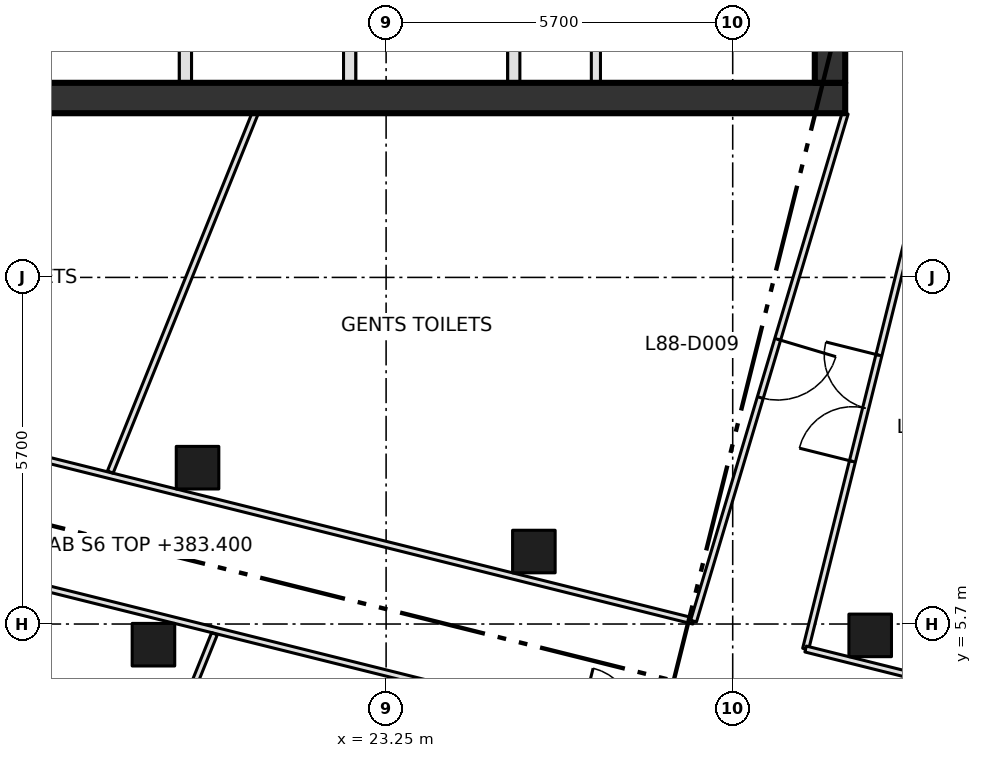
"""IFC4 building model, lengths in metres.
Left out: names, types, materials, properties, quantities, classifications, styles, units other than length and angle.
Written with IfcOpenShell. Run it as: python <this file> out.ifc"""

import sys

from ifc_helpers import new_model, si_unit, direction, frame, frame_2d, origin, origin_2d, place, context, subcontext, project, spatial, rectangle, extrude, element, fill, save


model = new_model("IFC4")
c1 = context("Model", 3, precision=1e-05, world=origin(), true_north=direction((0.0, 1.0)))
c2 = subcontext(c1, "Body", "Model", "MODEL_VIEW")
j1 = project(units=[si_unit("LENGTHUNIT", "METRE"), si_unit("PLANEANGLEUNIT", "RADIAN")], contexts=[c1])
p1 = place(None, origin())
s1 = spatial("IfcSite", under=j1, at=p1, CompositionType="ELEMENT")
p2 = place(p1, origin())
s2 = spatial("IfcBuilding", under=s1, at=p2, CompositionType="ELEMENT")
p3 = place(p2, frame((0.0, 0.0, 383.4)))
s3 = spatial("IfcBuildingStorey", under=s2, at=p3, CompositionType="ELEMENT", Elevation=383.4)
for number, where, z_axis, x_axis in (
    (1, (19.424, 5.36, 0.0), (0.0, 0.0, 1.0), (1.0, 0.0, 0.0)),
    (2, (20.149, 8.271, 0.0), (0.0, 0.0, 1.0), (1.0, 0.0, 0.0)),
    (3, (25.68, 6.892, 0.0), (0.0, 0.0, 1.0), (1.0, 0.0, 0.0)),
    (4, (31.211, 5.513, 0.0), (0.0, 0.0, 1.0), (1.0, 0.0, 0.0)),
):
    element("IfcColumn", number, at=place(p3, frame(where, z_axis=z_axis, x_axis=x_axis)), inside=s3, PredefinedType="COLUMN", context=c2, shape_type="SweptSolid", body=[
        extrude(rectangle(XDim=0.7, YDim=0.7, at=origin_2d()), origin(), (0.0, 0.0, 1.0), 4.2),
    ])
p4 = place(p3, frame((8.0, 14.35, -0.3), z_axis=(0.0, 0.0, 1.0), x_axis=(1.0, 0.0, 0.0)))
e5 = element("IfcWall", 5, at=p4, inside=s3, PredefinedType="SHEAR", context=c2, shape_type="SweptSolid", body=[
    extrude(rectangle(XDim=22.8, YDim=0.5, at=frame_2d((11.4, 0.0))), origin(), (0.0, 0.0, 1.0), 4.2),
])
p5 = place(p4, frame((2.3, 0.0, 0.3)))
e6 = element("IfcOpeningElement", 6, at=p5, cuts=e5, PredefinedType="OPENING", context=c2, shape_type="SweptSolid", body=[
    extrude(rectangle(XDim=1.8, YDim=2.1, at=frame_2d((0.9, 1.05))), frame((0.0, 0.26, 0.0), z_axis=(0.0, -1.0, 0.0), x_axis=(1.0, 0.0, 0.0)), (0.0, 0.0, 1.0), 0.52),
])
p6 = place(p3, frame((30.55, 14.6, -0.3), z_axis=(0.0, 0.0, 1.0), x_axis=(0.0, 1.0, 0.0)))
e7 = element("IfcWall", 7, at=p6, inside=s3, PredefinedType="SHEAR", context=c2, shape_type="SweptSolid", body=[
    extrude(rectangle(XDim=21.1, YDim=0.5, at=frame_2d((10.55, 0.0))), origin(), (0.0, 0.0, 1.0), 4.2),
])
for number, where, z_axis, x_axis in (
    (8, (19.95, 14.6, 0.0), (0.0, 0.0, 1.0), (0.0, 1.0, 0.0)),
    (9, (22.65, 14.6, 0.0), (0.0, 0.0, 1.0), (0.0, 1.0, 0.0)),
    (10, (25.35, 14.6, 0.0), (0.0, 0.0, 1.0), (0.0, 1.0, 0.0)),
):
    element("IfcWall", number, at=place(p3, frame(where, z_axis=z_axis, x_axis=x_axis)), inside=s3, PredefinedType="SOLIDWALL", context=c2, shape_type="SweptSolid", body=[
        extrude(rectangle(XDim=3.0, YDim=0.2, at=frame_2d((1.5, 0.0))), origin(), (0.0, 0.0, 1.0), 3.9),
    ])
p7 = place(p3, frame((26.7, 14.6, 0.0), z_axis=(0.0, 0.0, 1.0), x_axis=(0.0, 1.0, 0.0)))
e11 = element("IfcWall", 11, at=p7, inside=s3, PredefinedType="PARTITIONING", context=c2, shape_type="SweptSolid", body=[
    extrude(rectangle(XDim=3.0, YDim=0.15, at=frame_2d((1.5, 0.0))), origin(), (0.0, 0.0, 1.0), 3.9),
])
p8 = place(p3, frame((8.66, 8.532, 0.0), z_axis=(0.0, 0.0, 1.0), x_axis=(0.970305360263, -0.241883252509, 0.0)))
e12 = element("IfcWall", 12, at=p8, inside=s3, PredefinedType="PARTITIONING", context=c2, shape_type="SweptSolid", body=[
    extrude(rectangle(XDim=28.356, YDim=0.1, at=frame_2d((14.178, 0.0))), origin(), (0.0, 0.0, 1.0), 3.9),
])
p9 = place(p8, frame((18.321, 0.0, 0.0)))
e13 = element("IfcOpeningElement", 13, at=p9, cuts=e12, PredefinedType="OPENING", context=c2, shape_type="SweptSolid", body=[
    extrude(rectangle(XDim=1.8, YDim=2.1, at=frame_2d((0.9, 1.05))), frame((0.0, 0.06, 0.0), z_axis=(0.0, -1.0, 0.0), x_axis=(1.0, 0.0, 0.0)), (0.0, 0.0, 1.0), 0.12),
])
p10 = place(p8, frame((25.22, 0.0, 0.0)))
e14 = element("IfcOpeningElement", 14, at=p10, cuts=e12, PredefinedType="OPENING", context=c2, shape_type="SweptSolid", body=[
    extrude(rectangle(XDim=1.0, YDim=2.1, at=frame_2d((0.5, 1.05))), frame((0.0, 0.06, 0.0), z_axis=(0.0, -1.0, 0.0), x_axis=(1.0, 0.0, 0.0)), (0.0, 0.0, 1.0), 0.12),
])
p11 = place(p8, frame((5.18, 0.0, 0.0)))
e15 = element("IfcOpeningElement", 15, at=p11, cuts=e12, PredefinedType="OPENING", context=c2, shape_type="SweptSolid", body=[
    extrude(rectangle(XDim=1.0, YDim=2.1, at=frame_2d((0.5, 1.05))), frame((0.0, 0.06, 0.0), z_axis=(0.0, -1.0, 0.0), x_axis=(1.0, 0.0, 0.0)), (0.0, 0.0, 1.0), 0.12),
])
p12 = place(p3, frame((9.017, 10.558, 0.0), z_axis=(0.0, 0.0, 1.0), x_axis=(0.970286089829, -0.241960542, 0.0)))
e16 = element("IfcWall", 16, at=p12, inside=s3, PredefinedType="PARTITIONING", context=c2, shape_type="SweptSolid", body=[
    extrude(rectangle(XDim=19.879, YDim=0.1, at=frame_2d((9.94, 0.0))), origin(), (0.0, 0.0, 1.0), 3.9),
])
p13 = place(p12, frame((6.351, 0.0, 0.0)))
e17 = element("IfcOpeningElement", 17, at=p13, cuts=e16, PredefinedType="OPENING", context=c2, shape_type="SweptSolid", body=[
    extrude(rectangle(XDim=1.0, YDim=2.1, at=frame_2d((0.5, 1.05))), frame((0.0, 0.06, 0.0), z_axis=(0.0, -1.0, 0.0), x_axis=(1.0, 0.0, 0.0)), (0.0, 0.0, 1.0), 0.12),
])
p14 = place(p3, frame((30.149, 5.289, 0.0), z_axis=(0.0, 0.0, 1.0), x_axis=(0.241978995789, 0.970281487815, 0.0)))
e18 = element("IfcWall", 18, at=p14, inside=s3, PredefinedType="PARTITIONING", context=c2, shape_type="SweptSolid", body=[
    extrude(rectangle(XDim=8.05, YDim=0.1, at=frame_2d((4.025, 0.0))), origin(), (0.0, 0.0, 1.0), 3.9),
])
p15 = place(p14, frame((3.18, 0.0, 0.0)))
e19 = element("IfcOpeningElement", 19, at=p15, cuts=e18, PredefinedType="OPENING", context=c2, shape_type="SweptSolid", body=[
    extrude(rectangle(XDim=1.8, YDim=2.1, at=frame_2d((0.9, 1.05))), frame((0.0, 0.06, 0.0), z_axis=(0.0, -1.0, 0.0), x_axis=(1.0, 0.0, 0.0)), (0.0, 0.0, 1.0), 0.12),
])
p16 = place(p3, frame((30.8, 14.1, 0.0), z_axis=(0.0, 0.0, 1.0), x_axis=(-0.286139929679, -0.958187842045, 0.0)))
e20 = element("IfcWall", 20, at=p16, inside=s3, PredefinedType="PARTITIONING", context=c2, shape_type="SweptSolid", body=[
    extrude(rectangle(XDim=8.717, YDim=0.1, at=frame_2d((4.358, 0.0))), origin(), (0.0, 0.0, 1.0), 3.9),
])
p17 = place(p16, frame((3.88, 0.0, 0.0)))
e21 = element("IfcOpeningElement", 21, at=p17, cuts=e20, PredefinedType="OPENING", context=c2, shape_type="SweptSolid", body=[
    extrude(rectangle(XDim=1.0, YDim=2.1, at=frame_2d((0.5, 1.05))), frame((0.0, 0.06, 0.0), z_axis=(0.0, -1.0, 0.0), x_axis=(1.0, 0.0, 0.0)), (0.0, 0.0, 1.0), 0.12),
])
p18 = place(p3, frame((36.67, 3.663, 0.0), z_axis=(0.0, 0.0, 1.0), x_axis=(-0.970291897054, 0.241937253253, 0.0)))
e22 = element("IfcWall", 22, at=p18, inside=s3, PredefinedType="PARTITIONING", context=c2, shape_type="SweptSolid", body=[
    extrude(rectangle(XDim=6.721, YDim=0.1, at=frame_2d((3.36, 0.0))), origin(), (0.0, 0.0, 1.0), 3.9),
])
p19 = place(p3, frame((16.861, -3.288, 0.0), z_axis=(0.0, 0.0, 1.0), x_axis=(0.374527492133, 0.927215809635, 0.0)))
e23 = element("IfcWall", 23, at=p19, inside=s3, PredefinedType="PARTITIONING", context=c2, shape_type="SweptSolid", body=[
    extrude(rectangle(XDim=9.521, YDim=0.1, at=frame_2d((4.76, 0.0))), origin(), (0.0, 0.0, 1.0), 3.9),
])
p20 = place(p3, frame((18.714, 8.199, 0.0), z_axis=(0.0, 0.0, 1.0), x_axis=(0.374418014388, 0.927260023133, 0.0)))
e24 = element("IfcWall", 24, at=p20, inside=s3, PredefinedType="PARTITIONING", context=c2, shape_type="SweptSolid", body=[
    extrude(rectangle(XDim=6.364, YDim=0.1, at=frame_2d((3.182, 0.0))), origin(), (0.0, 0.0, 1.0), 3.9),
])
p21 = place(p17, origin())
e25 = element("IfcDoor", 25, at=p21, inside=s3, OperationType="SINGLE_SWING_LEFT", PredefinedType="DOOR", context=c2, shape_type="SweptSolid", body=[
    extrude(rectangle(XDim=1.0, YDim=2.1, at=frame_2d((0.5, 1.05))), frame((0.0, 0.025, 0.0), z_axis=(0.0, -1.0, 0.0), x_axis=(1.0, 0.0, 0.0)), (0.0, 0.0, 1.0), 0.05),
])
fill(e21, e25)
p22 = place(p15, origin())
e26 = element("IfcDoor", 26, at=p22, inside=s3, OperationType="DOUBLE_DOOR_SINGLE_SWING", PredefinedType="DOOR", context=c2, shape_type="SweptSolid", body=[
    extrude(rectangle(XDim=1.8, YDim=2.1, at=frame_2d((0.9, 1.05))), frame((0.0, 0.025, 0.0), z_axis=(0.0, -1.0, 0.0), x_axis=(1.0, 0.0, 0.0)), (0.0, 0.0, 1.0), 0.05),
])
fill(e19, e26)
save(model, sys.argv[1])
